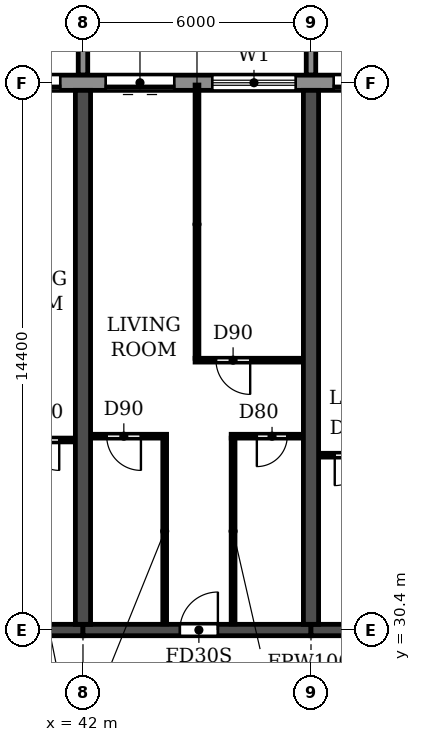
"""IFC4 building model, lengths in metres.
Left out: names, types, materials, properties, quantities, classifications, styles, units other than length and angle.
Written with IfcOpenShell. Run it as: python <this file> out.ifc"""

import sys

from ifc_helpers import new_model, si_unit, direction, frame, frame_2d, origin, place, context, subcontext, project, spatial, polyline, rectangle, outline, extrude, source, transform, mapped, element, fill, save


model = new_model("IFC4")
c1 = context("Model", 3, precision=1e-05, world=origin(), true_north=direction((0.0, 1.0)))
c2 = subcontext(c1, "Body", "Model", "MODEL_VIEW")
j1 = project(units=[si_unit("LENGTHUNIT", "METRE"), si_unit("PLANEANGLEUNIT", "RADIAN")], contexts=[c1])
p1 = place(None, origin())
s1 = spatial("IfcSite", under=j1, at=p1, CompositionType="ELEMENT")
p2 = place(p1, origin())
s2 = spatial("IfcBuilding", under=s1, at=p2, CompositionType="ELEMENT")
p3 = place(p2, frame((0.0, 0.0, 26.7)))
s3 = spatial("IfcBuildingStorey", under=s2, at=p3, CompositionType="ELEMENT", Elevation=26.7)
for number, where, z_axis, x_axis in (
    (1, (42.0, 30.55, 0.0), (0.0, 0.0, 1.0), (0.0, 1.0, 0.0)),
    (2, (48.0, 30.55, 0.0), (0.0, 0.0, 1.0), (0.0, 1.0, 0.0)),
):
    element("IfcWall", number, at=place(p3, frame(where, z_axis=z_axis, x_axis=x_axis)), inside=s3, PredefinedType="SHEAR", context=c2, shape_type="SweptSolid", body=[
        extrude(rectangle(XDim=14.05, YDim=0.4, at=frame_2d((7.025, 0.0))), origin(), (0.0, 0.0, 1.0), 3.05),
    ])
p4 = place(p3, frame((36.0, 30.4, 0.0), z_axis=(0.0, 0.0, 1.0), x_axis=(1.0, 0.0, 0.0)))
e3 = element("IfcWall", 3, at=p4, inside=s3, PredefinedType="SHEAR", context=c2, shape_type="SweptSolid", body=[
    extrude(rectangle(XDim=6.0, YDim=0.3, at=frame_2d((3.0, 0.0))), origin(), (0.0, 0.0, 1.0), 2.45),
])
p5 = place(p4, frame((2.55, 0.0, 0.0)))
e4 = element("IfcOpeningElement", 4, at=p5, cuts=e3, PredefinedType="OPENING", context=c2, shape_type="SweptSolid", body=[
    extrude(rectangle(XDim=1.0, YDim=2.1, at=frame_2d((0.5, 1.05))), frame((0.0, 0.16, 0.0), z_axis=(0.0, -1.0, 0.0), x_axis=(1.0, 0.0, 0.0)), (0.0, 0.0, 1.0), 0.32),
])
p6 = place(p3, frame((42.0, 30.4, 0.0), z_axis=(0.0, 0.0, 1.0), x_axis=(1.0, 0.0, 0.0)))
e5 = element("IfcWall", 5, at=p6, inside=s3, PredefinedType="SHEAR", context=c2, shape_type="SweptSolid", body=[
    extrude(rectangle(XDim=6.0, YDim=0.3, at=frame_2d((3.0, 0.0))), origin(), (0.0, 0.0, 1.0), 2.45),
])
p7 = place(p6, frame((2.55, 0.0, 0.0)))
e6 = element("IfcOpeningElement", 6, at=p7, cuts=e5, PredefinedType="OPENING", context=c2, shape_type="SweptSolid", body=[
    extrude(rectangle(XDim=1.0, YDim=2.1, at=frame_2d((0.5, 1.05))), frame((0.0, 0.16, 0.0), z_axis=(0.0, -1.0, 0.0), x_axis=(1.0, 0.0, 0.0)), (0.0, 0.0, 1.0), 0.32),
])
p8 = place(p3, frame((48.0, 30.4, 0.0), z_axis=(0.0, 0.0, 1.0), x_axis=(1.0, 0.0, 0.0)))
e7 = element("IfcWall", 7, at=p8, inside=s3, PredefinedType="SHEAR", context=c2, shape_type="SweptSolid", body=[
    extrude(rectangle(XDim=6.0, YDim=0.3, at=frame_2d((3.0, 0.0))), origin(), (0.0, 0.0, 1.0), 2.45),
])
p9 = place(p8, frame((2.45, 0.0, 0.0)))
e8 = element("IfcOpeningElement", 8, at=p9, cuts=e7, PredefinedType="OPENING", context=c2, shape_type="SweptSolid", body=[
    extrude(rectangle(XDim=1.0, YDim=2.1, at=frame_2d((0.5, 1.05))), frame((0.0, 0.16, 0.0), z_axis=(0.0, -1.0, 0.0), x_axis=(1.0, 0.0, 0.0)), (0.0, 0.0, 1.0), 0.32),
])
p10 = place(p3, frame((97.317, 44.8, 0.0), z_axis=(0.0, 0.0, 1.0), x_axis=(-1.0, 0.0, 0.0)))
e9 = element("IfcWall", 9, at=p10, inside=s3, PredefinedType="STANDARD", context=c2, shape_type="SweptSolid", body=[
    extrude(rectangle(XDim=92.634, YDim=0.4, at=frame_2d((46.317, 0.0))), origin(), (0.0, 0.0, 1.0), 3.05),
])
p11 = place(p10, frame((88.717, 0.0, 0.9)))
e10 = element("IfcOpeningElement", 10, at=p11, cuts=e9, PredefinedType="OPENING", context=c2, shape_type="SweptSolid", body=[
    extrude(rectangle(XDim=2.2, YDim=1.5, at=frame_2d((1.1, 0.75))), frame((0.0, 0.21, 0.0), z_axis=(0.0, -1.0, 0.0), x_axis=(1.0, 0.0, 0.0)), (0.0, 0.0, 1.0), 0.42),
])
p12 = place(p10, frame((85.917, 0.0, 0.0)))
e11 = element("IfcOpeningElement", 11, at=p12, cuts=e9, PredefinedType="OPENING", context=c2, shape_type="SweptSolid", body=[
    extrude(rectangle(XDim=1.8, YDim=2.4, at=frame_2d((0.9, 1.2))), frame((0.0, 0.21, 0.0), z_axis=(0.0, -1.0, 0.0), x_axis=(1.0, 0.0, 0.0)), (0.0, 0.0, 1.0), 0.42),
])
p13 = place(p10, frame((82.717, 0.0, 0.9)))
e12 = element("IfcOpeningElement", 12, at=p13, cuts=e9, PredefinedType="OPENING", context=c2, shape_type="SweptSolid", body=[
    extrude(rectangle(XDim=2.2, YDim=1.5, at=frame_2d((1.1, 0.75))), frame((0.0, 0.21, 0.0), z_axis=(0.0, -1.0, 0.0), x_axis=(1.0, 0.0, 0.0)), (0.0, 0.0, 1.0), 0.42),
])
p14 = place(p10, frame((79.717, 0.0, 0.9)))
e13 = element("IfcOpeningElement", 13, at=p14, cuts=e9, PredefinedType="OPENING", context=c2, shape_type="SweptSolid", body=[
    extrude(rectangle(XDim=2.2, YDim=1.5, at=frame_2d((1.1, 0.75))), frame((0.0, 0.21, 0.0), z_axis=(0.0, -1.0, 0.0), x_axis=(1.0, 0.0, 0.0)), (0.0, 0.0, 1.0), 0.42),
])
p15 = place(p10, frame((76.917, 0.0, 0.0)))
e14 = element("IfcOpeningElement", 14, at=p15, cuts=e9, PredefinedType="OPENING", context=c2, shape_type="SweptSolid", body=[
    extrude(rectangle(XDim=1.8, YDim=2.4, at=frame_2d((0.9, 1.2))), frame((0.0, 0.21, 0.0), z_axis=(0.0, -1.0, 0.0), x_axis=(1.0, 0.0, 0.0)), (0.0, 0.0, 1.0), 0.42),
])
p16 = place(p10, frame((73.717, 0.0, 0.9)))
e15 = element("IfcOpeningElement", 15, at=p16, cuts=e9, PredefinedType="OPENING", context=c2, shape_type="SweptSolid", body=[
    extrude(rectangle(XDim=2.2, YDim=1.5, at=frame_2d((1.1, 0.75))), frame((0.0, 0.21, 0.0), z_axis=(0.0, -1.0, 0.0), x_axis=(1.0, 0.0, 0.0)), (0.0, 0.0, 1.0), 0.42),
])
p17 = place(p10, frame((70.717, 0.0, 0.9)))
e16 = element("IfcOpeningElement", 16, at=p17, cuts=e9, PredefinedType="OPENING", context=c2, shape_type="SweptSolid", body=[
    extrude(rectangle(XDim=2.2, YDim=1.5, at=frame_2d((1.1, 0.75))), frame((0.0, 0.21, 0.0), z_axis=(0.0, -1.0, 0.0), x_axis=(1.0, 0.0, 0.0)), (0.0, 0.0, 1.0), 0.42),
])
p18 = place(p10, frame((67.717, 0.0, 0.9)))
e17 = element("IfcOpeningElement", 17, at=p18, cuts=e9, PredefinedType="OPENING", context=c2, shape_type="SweptSolid", body=[
    extrude(rectangle(XDim=2.2, YDim=1.5, at=frame_2d((1.1, 0.75))), frame((0.0, 0.21, 0.0), z_axis=(0.0, -1.0, 0.0), x_axis=(1.0, 0.0, 0.0)), (0.0, 0.0, 1.0), 0.42),
])
p19 = place(p10, frame((64.917, 0.0, 0.0)))
e18 = element("IfcOpeningElement", 18, at=p19, cuts=e9, PredefinedType="OPENING", context=c2, shape_type="SweptSolid", body=[
    extrude(rectangle(XDim=1.8, YDim=2.4, at=frame_2d((0.9, 1.2))), frame((0.0, 0.21, 0.0), z_axis=(0.0, -1.0, 0.0), x_axis=(1.0, 0.0, 0.0)), (0.0, 0.0, 1.0), 0.42),
])
p20 = place(p10, frame((61.717, 0.0, 0.9)))
e19 = element("IfcOpeningElement", 19, at=p20, cuts=e9, PredefinedType="OPENING", context=c2, shape_type="SweptSolid", body=[
    extrude(rectangle(XDim=2.2, YDim=1.5, at=frame_2d((1.1, 0.75))), frame((0.0, 0.21, 0.0), z_axis=(0.0, -1.0, 0.0), x_axis=(1.0, 0.0, 0.0)), (0.0, 0.0, 1.0), 0.42),
])
p21 = place(p10, frame((58.717, 0.0, 0.9)))
e20 = element("IfcOpeningElement", 20, at=p21, cuts=e9, PredefinedType="OPENING", context=c2, shape_type="SweptSolid", body=[
    extrude(rectangle(XDim=2.2, YDim=1.5, at=frame_2d((1.1, 0.75))), frame((0.0, 0.21, 0.0), z_axis=(0.0, -1.0, 0.0), x_axis=(1.0, 0.0, 0.0)), (0.0, 0.0, 1.0), 0.42),
])
p22 = place(p10, frame((55.917, 0.0, 0.0)))
e21 = element("IfcOpeningElement", 21, at=p22, cuts=e9, PredefinedType="OPENING", context=c2, shape_type="SweptSolid", body=[
    extrude(rectangle(XDim=1.8, YDim=2.4, at=frame_2d((0.9, 1.2))), frame((0.0, 0.21, 0.0), z_axis=(0.0, -1.0, 0.0), x_axis=(1.0, 0.0, 0.0)), (0.0, 0.0, 1.0), 0.42),
])
p23 = place(p10, frame((52.917, 0.0, 0.0)))
e22 = element("IfcOpeningElement", 22, at=p23, cuts=e9, PredefinedType="OPENING", context=c2, shape_type="SweptSolid", body=[
    extrude(rectangle(XDim=1.8, YDim=2.4, at=frame_2d((0.9, 1.2))), frame((0.0, 0.21, 0.0), z_axis=(0.0, -1.0, 0.0), x_axis=(1.0, 0.0, 0.0)), (0.0, 0.0, 1.0), 0.42),
])
p24 = place(p10, frame((49.717, 0.0, 0.9)))
e23 = element("IfcOpeningElement", 23, at=p24, cuts=e9, PredefinedType="OPENING", context=c2, shape_type="SweptSolid", body=[
    extrude(rectangle(XDim=2.2, YDim=1.5, at=frame_2d((1.1, 0.75))), frame((0.0, 0.21, 0.0), z_axis=(0.0, -1.0, 0.0), x_axis=(1.0, 0.0, 0.0)), (0.0, 0.0, 1.0), 0.42),
])
p25 = place(p10, frame((46.917, 0.0, 0.0)))
e24 = element("IfcOpeningElement", 24, at=p25, cuts=e9, PredefinedType="OPENING", context=c2, shape_type="SweptSolid", body=[
    extrude(rectangle(XDim=1.8, YDim=2.4, at=frame_2d((0.9, 1.2))), frame((0.0, 0.21, 0.0), z_axis=(0.0, -1.0, 0.0), x_axis=(1.0, 0.0, 0.0)), (0.0, 0.0, 1.0), 0.42),
])
p26 = place(p10, frame((43.717, 0.0, 0.9)))
e25 = element("IfcOpeningElement", 25, at=p26, cuts=e9, PredefinedType="OPENING", context=c2, shape_type="SweptSolid", body=[
    extrude(rectangle(XDim=2.2, YDim=1.5, at=frame_2d((1.1, 0.75))), frame((0.0, 0.21, 0.0), z_axis=(0.0, -1.0, 0.0), x_axis=(1.0, 0.0, 0.0)), (0.0, 0.0, 1.0), 0.42),
])
p27 = place(p10, frame((40.717, 0.0, 0.9)))
e26 = element("IfcOpeningElement", 26, at=p27, cuts=e9, PredefinedType="OPENING", context=c2, shape_type="SweptSolid", body=[
    extrude(rectangle(XDim=2.2, YDim=1.5, at=frame_2d((1.1, 0.75))), frame((0.0, 0.21, 0.0), z_axis=(0.0, -1.0, 0.0), x_axis=(1.0, 0.0, 0.0)), (0.0, 0.0, 1.0), 0.42),
])
p28 = place(p10, frame((37.917, 0.0, 0.0)))
e27 = element("IfcOpeningElement", 27, at=p28, cuts=e9, PredefinedType="OPENING", context=c2, shape_type="SweptSolid", body=[
    extrude(rectangle(XDim=1.8, YDim=2.4, at=frame_2d((0.9, 1.2))), frame((0.0, 0.21, 0.0), z_axis=(0.0, -1.0, 0.0), x_axis=(1.0, 0.0, 0.0)), (0.0, 0.0, 1.0), 0.42),
])
p29 = place(p10, frame((34.917, 0.0, 0.0)))
e28 = element("IfcOpeningElement", 28, at=p29, cuts=e9, PredefinedType="OPENING", context=c2, shape_type="SweptSolid", body=[
    extrude(rectangle(XDim=1.8, YDim=2.4, at=frame_2d((0.9, 1.2))), frame((0.0, 0.21, 0.0), z_axis=(0.0, -1.0, 0.0), x_axis=(1.0, 0.0, 0.0)), (0.0, 0.0, 1.0), 0.42),
])
p30 = place(p10, frame((31.717, 0.0, 0.9)))
e29 = element("IfcOpeningElement", 29, at=p30, cuts=e9, PredefinedType="OPENING", context=c2, shape_type="SweptSolid", body=[
    extrude(rectangle(XDim=2.2, YDim=1.5, at=frame_2d((1.1, 0.75))), frame((0.0, 0.21, 0.0), z_axis=(0.0, -1.0, 0.0), x_axis=(1.0, 0.0, 0.0)), (0.0, 0.0, 1.0), 0.42),
])
p31 = place(p10, frame((28.717, 0.0, 0.9)))
e30 = element("IfcOpeningElement", 30, at=p31, cuts=e9, PredefinedType="OPENING", context=c2, shape_type="SweptSolid", body=[
    extrude(rectangle(XDim=2.2, YDim=1.5, at=frame_2d((1.1, 0.75))), frame((0.0, 0.21, 0.0), z_axis=(0.0, -1.0, 0.0), x_axis=(1.0, 0.0, 0.0)), (0.0, 0.0, 1.0), 0.42),
])
p32 = place(p10, frame((25.717, 0.0, 0.9)))
e31 = element("IfcOpeningElement", 31, at=p32, cuts=e9, PredefinedType="OPENING", context=c2, shape_type="SweptSolid", body=[
    extrude(rectangle(XDim=2.2, YDim=1.5, at=frame_2d((1.1, 0.75))), frame((0.0, 0.21, 0.0), z_axis=(0.0, -1.0, 0.0), x_axis=(1.0, 0.0, 0.0)), (0.0, 0.0, 1.0), 0.42),
])
p33 = place(p10, frame((22.717, 0.0, 0.9)))
e32 = element("IfcOpeningElement", 32, at=p33, cuts=e9, PredefinedType="OPENING", context=c2, shape_type="SweptSolid", body=[
    extrude(rectangle(XDim=2.2, YDim=1.5, at=frame_2d((1.1, 0.75))), frame((0.0, 0.21, 0.0), z_axis=(0.0, -1.0, 0.0), x_axis=(1.0, 0.0, 0.0)), (0.0, 0.0, 1.0), 0.42),
])
p34 = place(p10, frame((19.917, 0.0, 0.0)))
e33 = element("IfcOpeningElement", 33, at=p34, cuts=e9, PredefinedType="OPENING", context=c2, shape_type="SweptSolid", body=[
    extrude(rectangle(XDim=1.8, YDim=2.4, at=frame_2d((0.9, 1.2))), frame((0.0, 0.21, 0.0), z_axis=(0.0, -1.0, 0.0), x_axis=(1.0, 0.0, 0.0)), (0.0, 0.0, 1.0), 0.42),
])
p35 = place(p10, frame((16.717, 0.0, 0.9)))
e34 = element("IfcOpeningElement", 34, at=p35, cuts=e9, PredefinedType="OPENING", context=c2, shape_type="SweptSolid", body=[
    extrude(rectangle(XDim=2.2, YDim=1.5, at=frame_2d((1.1, 0.75))), frame((0.0, 0.21, 0.0), z_axis=(0.0, -1.0, 0.0), x_axis=(1.0, 0.0, 0.0)), (0.0, 0.0, 1.0), 0.42),
])
p36 = place(p10, frame((13.717, 0.0, 0.9)))
e35 = element("IfcOpeningElement", 35, at=p36, cuts=e9, PredefinedType="OPENING", context=c2, shape_type="SweptSolid", body=[
    extrude(rectangle(XDim=2.2, YDim=1.5, at=frame_2d((1.1, 0.75))), frame((0.0, 0.21, 0.0), z_axis=(0.0, -1.0, 0.0), x_axis=(1.0, 0.0, 0.0)), (0.0, 0.0, 1.0), 0.42),
])
p37 = place(p10, frame((10.717, 0.0, 0.9)))
e36 = element("IfcOpeningElement", 36, at=p37, cuts=e9, PredefinedType="OPENING", context=c2, shape_type="SweptSolid", body=[
    extrude(rectangle(XDim=2.2, YDim=1.5, at=frame_2d((1.1, 0.75))), frame((0.0, 0.21, 0.0), z_axis=(0.0, -1.0, 0.0), x_axis=(1.0, 0.0, 0.0)), (0.0, 0.0, 1.0), 0.42),
])
p38 = place(p10, frame((7.917, 0.0, 0.0)))
e37 = element("IfcOpeningElement", 37, at=p38, cuts=e9, PredefinedType="OPENING", context=c2, shape_type="SweptSolid", body=[
    extrude(rectangle(XDim=1.8, YDim=2.4, at=frame_2d((0.9, 1.2))), frame((0.0, 0.21, 0.0), z_axis=(0.0, -1.0, 0.0), x_axis=(1.0, 0.0, 0.0)), (0.0, 0.0, 1.0), 0.42),
])
p39 = place(p10, frame((4.917, 0.0, 0.0)))
e38 = element("IfcOpeningElement", 38, at=p39, cuts=e9, PredefinedType="OPENING", context=c2, shape_type="SweptSolid", body=[
    extrude(rectangle(XDim=1.8, YDim=2.4, at=frame_2d((0.9, 1.2))), frame((0.0, 0.21, 0.0), z_axis=(0.0, -1.0, 0.0), x_axis=(1.0, 0.0, 0.0)), (0.0, 0.0, 1.0), 0.42),
])
p40 = place(p10, frame((1.717, 0.0, 0.9)))
e39 = element("IfcOpeningElement", 39, at=p40, cuts=e9, PredefinedType="OPENING", context=c2, shape_type="SweptSolid", body=[
    extrude(rectangle(XDim=2.2, YDim=1.5, at=frame_2d((1.1, 0.75))), frame((0.0, 0.21, 0.0), z_axis=(0.0, -1.0, 0.0), x_axis=(1.0, 0.0, 0.0)), (0.0, 0.0, 1.0), 0.42),
])
m1 = source(origin(), c2, "Body", "SweptSolid", [
    extrude(outline(polyline([(0.0, 0.0), (0.25, 0.0), (0.25, 3.1), (0.0, 3.1), (0.0, 0.0)])), origin(), (0.0, 0.0, 1.0), 3.1),
])
for number, where in (
    (40, (41.875, 45.0, 0.0)),
    (41, (47.875, 45.0, 0.0)),
):
    element("IfcWall", number, at=place(p3, frame(where)), inside=s3, PredefinedType="STANDARD", context=c2, shape_type="MappedRepresentation", body=[
        mapped(m1, transform((0.0, 0.0, 0.0))),
    ])
p41 = place(p3, frame((48.21, 35.0, 0.0), z_axis=(0.0, 0.0, 1.0), x_axis=(1.0, 0.0, 0.0)))
e42 = element("IfcWall", 42, at=p41, inside=s3, PredefinedType="PARTITIONING", context=c2, shape_type="SweptSolid", body=[
    extrude(rectangle(XDim=1.89, YDim=0.1, at=frame_2d((0.945, 0.0))), origin(), (0.0, 0.0, 1.0), 3.05),
])
p42 = place(p41, frame((0.415, 0.0, 0.0)))
e43 = element("IfcOpeningElement", 43, at=p42, cuts=e42, PredefinedType="OPENING", context=c2, shape_type="SweptSolid", body=[
    extrude(rectangle(XDim=0.8, YDim=2.1, at=frame_2d((0.4, 1.05))), frame((0.0, 0.06, 0.0), z_axis=(0.0, -1.0, 0.0), x_axis=(1.0, 0.0, 0.0)), (0.0, 0.0, 1.0), 0.12),
])
p43 = place(p3, frame((39.9, 35.4, 0.0), z_axis=(0.0, 0.0, 1.0), x_axis=(1.0, 0.0, 0.0)))
e44 = element("IfcWall", 44, at=p43, inside=s3, PredefinedType="PARTITIONING", context=c2, shape_type="SweptSolid", body=[
    extrude(rectangle(XDim=1.89, YDim=0.1, at=frame_2d((0.945, 0.0))), origin(), (0.0, 0.0, 1.0), 3.05),
])
p44 = place(p43, frame((0.675, 0.0, 0.0)))
e45 = element("IfcOpeningElement", 45, at=p44, cuts=e44, PredefinedType="OPENING", context=c2, shape_type="SweptSolid", body=[
    extrude(rectangle(XDim=0.8, YDim=2.1, at=frame_2d((0.4, 1.05))), frame((0.0, 0.06, 0.0), z_axis=(0.0, -1.0, 0.0), x_axis=(1.0, 0.0, 0.0)), (0.0, 0.0, 1.0), 0.12),
])
p45 = place(p3, frame((42.21, 35.5, 0.0), z_axis=(0.0, 0.0, 1.0), x_axis=(1.0, 0.0, 0.0)))
e46 = element("IfcWall", 46, at=p45, inside=s3, PredefinedType="PARTITIONING", context=c2, shape_type="SweptSolid", body=[
    extrude(rectangle(XDim=1.99, YDim=0.1, at=frame_2d((0.995, 0.0))), origin(), (0.0, 0.0, 1.0), 3.05),
])
p46 = place(p45, frame((0.415, 0.0, 0.0)))
e47 = element("IfcOpeningElement", 47, at=p46, cuts=e46, PredefinedType="OPENING", context=c2, shape_type="SweptSolid", body=[
    extrude(rectangle(XDim=0.9, YDim=2.1, at=frame_2d((0.45, 1.05))), frame((0.0, 0.06, 0.0), z_axis=(0.0, -1.0, 0.0), x_axis=(1.0, 0.0, 0.0)), (0.0, 0.0, 1.0), 0.12),
])
p47 = place(p3, frame((45.9, 35.5, 0.0), z_axis=(0.0, 0.0, 1.0), x_axis=(1.0, 0.0, 0.0)))
e48 = element("IfcWall", 48, at=p47, inside=s3, PredefinedType="PARTITIONING", context=c2, shape_type="SweptSolid", body=[
    extrude(rectangle(XDim=1.89, YDim=0.1, at=frame_2d((0.945, 0.0))), origin(), (0.0, 0.0, 1.0), 3.05),
])
p48 = place(p47, frame((0.675, 0.0, 0.0)))
e49 = element("IfcOpeningElement", 49, at=p48, cuts=e48, PredefinedType="OPENING", context=c2, shape_type="SweptSolid", body=[
    extrude(rectangle(XDim=0.8, YDim=2.1, at=frame_2d((0.4, 1.05))), frame((0.0, 0.06, 0.0), z_axis=(0.0, -1.0, 0.0), x_axis=(1.0, 0.0, 0.0)), (0.0, 0.0, 1.0), 0.12),
])
p49 = place(p3, frame((44.95, 37.5, 0.0), z_axis=(0.0, 0.0, 1.0), x_axis=(1.0, 0.0, 0.0)))
e50 = element("IfcWall", 50, at=p49, inside=s3, PredefinedType="PARTITIONING", context=c2, shape_type="SweptSolid", body=[
    extrude(rectangle(XDim=2.84, YDim=0.1, at=frame_2d((1.42, 0.0))), origin(), (0.0, 0.0, 1.0), 3.05),
])
p50 = place(p49, frame((0.55, 0.0, 0.0)))
e51 = element("IfcOpeningElement", 51, at=p50, cuts=e50, PredefinedType="OPENING", context=c2, shape_type="SweptSolid", body=[
    extrude(rectangle(XDim=0.9, YDim=2.1, at=frame_2d((0.45, 1.05))), frame((0.0, 0.06, 0.0), z_axis=(0.0, -1.0, 0.0), x_axis=(1.0, 0.0, 0.0)), (0.0, 0.0, 1.0), 0.12),
])
p51 = place(p3, frame((44.15, 30.56, 0.0), z_axis=(0.0, 0.0, 1.0), x_axis=(0.0, 1.0, 0.0)))
e52 = element("IfcWall", 52, at=p51, inside=s3, PredefinedType="PARTITIONING", context=c2, shape_type="SweptSolid", body=[
    extrude(rectangle(XDim=4.89, YDim=0.1, at=frame_2d((2.445, 0.0))), origin(), (0.0, 0.0, 1.0), 3.05),
])
p52 = place(p3, frame((45.0, 37.55, 0.0), z_axis=(0.0, 0.0, 1.0), x_axis=(0.0, 1.0, 0.0)))
e53 = element("IfcWall", 53, at=p52, inside=s3, PredefinedType="PARTITIONING", context=c2, shape_type="SweptSolid", body=[
    extrude(rectangle(XDim=7.19, YDim=0.1, at=frame_2d((3.595, 0.0))), origin(), (0.0, 0.0, 1.0), 3.05),
])
p53 = place(p3, frame((45.95, 30.56, 0.0), z_axis=(0.0, 0.0, 1.0), x_axis=(0.0, 1.0, 0.0)))
e54 = element("IfcWall", 54, at=p53, inside=s3, PredefinedType="PARTITIONING", context=c2, shape_type="SweptSolid", body=[
    extrude(rectangle(XDim=4.89, YDim=0.1, at=frame_2d((2.445, 0.0))), origin(), (0.0, 0.0, 1.0), 3.05),
])
p54 = place(p22, origin())
e55 = element("IfcDoor", 55, at=p54, inside=s3, OperationType="DOUBLE_DOOR_SLIDING", PredefinedType="DOOR", context=c2, shape_type="SweptSolid", body=[
    extrude(rectangle(XDim=1.8, YDim=2.4, at=frame_2d((0.9, 1.2))), frame((0.0, 0.025, 0.0), z_axis=(0.0, -1.0, 0.0), x_axis=(1.0, 0.0, 0.0)), (0.0, 0.0, 1.0), 0.05),
])
fill(e21, e55)
p55 = place(p23, origin())
e56 = element("IfcDoor", 56, at=p55, inside=s3, OperationType="DOUBLE_DOOR_SLIDING", PredefinedType="DOOR", context=c2, shape_type="SweptSolid", body=[
    extrude(rectangle(XDim=1.8, YDim=2.4, at=frame_2d((0.9, 1.2))), frame((0.0, 0.025, 0.0), z_axis=(0.0, -1.0, 0.0), x_axis=(1.0, 0.0, 0.0)), (0.0, 0.0, 1.0), 0.05),
])
fill(e22, e56)
p56 = place(p24, origin())
e57 = element("IfcWindow", 57, at=p56, inside=s3, PartitioningType="DOUBLE_PANEL_HORIZONTAL", PredefinedType="WINDOW", context=c2, shape_type="SweptSolid", body=[
    extrude(rectangle(XDim=2.2, YDim=1.5, at=frame_2d((1.1, 0.75))), frame((0.0, 0.03, 0.0), z_axis=(0.0, -1.0, 0.0), x_axis=(1.0, 0.0, 0.0)), (0.0, 0.0, 1.0), 0.06),
])
fill(e23, e57)
p57 = place(p25, origin())
e58 = element("IfcDoor", 58, at=p57, inside=s3, OperationType="DOUBLE_DOOR_SLIDING", PredefinedType="DOOR", context=c2, shape_type="SweptSolid", body=[
    extrude(rectangle(XDim=1.8, YDim=2.4, at=frame_2d((0.9, 1.2))), frame((0.0, 0.025, 0.0), z_axis=(0.0, -1.0, 0.0), x_axis=(1.0, 0.0, 0.0)), (0.0, 0.0, 1.0), 0.05),
])
fill(e24, e58)
p58 = place(p44, frame((0.8, 0.0, 0.0), z_axis=(0.0, 0.0, 1.0), x_axis=(-1.0, 0.0, 0.0)))
e59 = element("IfcDoor", 59, at=p58, inside=s3, OperationType="SINGLE_SWING_LEFT", PredefinedType="DOOR", context=c2, shape_type="SweptSolid", body=[
    extrude(rectangle(XDim=0.8, YDim=2.1, at=frame_2d((0.4, 1.05))), frame((0.0, 0.025, 0.0), z_axis=(0.0, -1.0, 0.0), x_axis=(1.0, 0.0, 0.0)), (0.0, 0.0, 1.0), 0.05),
])
fill(e45, e59)
p59 = place(p46, frame((0.9, 0.0, 0.0), z_axis=(0.0, 0.0, 1.0), x_axis=(-1.0, 0.0, 0.0)))
e60 = element("IfcDoor", 60, at=p59, inside=s3, OperationType="SINGLE_SWING_LEFT", PredefinedType="DOOR", context=c2, shape_type="SweptSolid", body=[
    extrude(rectangle(XDim=0.9, YDim=2.1, at=frame_2d((0.45, 1.05))), frame((0.0, 0.025, 0.0), z_axis=(0.0, -1.0, 0.0), x_axis=(1.0, 0.0, 0.0)), (0.0, 0.0, 1.0), 0.05),
])
fill(e47, e60)
p60 = place(p7, origin())
e61 = element("IfcDoor", 61, at=p60, inside=s3, OperationType="SINGLE_SWING_RIGHT", PredefinedType="DOOR", context=c2, shape_type="SweptSolid", body=[
    extrude(rectangle(XDim=1.0, YDim=2.1, at=frame_2d((0.5, 1.05))), frame((0.0, 0.025, 0.0), z_axis=(0.0, -1.0, 0.0), x_axis=(1.0, 0.0, 0.0)), (0.0, 0.0, 1.0), 0.05),
])
fill(e6, e61)
p61 = place(p50, frame((0.9, 0.0, 0.0), z_axis=(0.0, 0.0, 1.0), x_axis=(-1.0, 0.0, 0.0)))
e62 = element("IfcDoor", 62, at=p61, inside=s3, OperationType="SINGLE_SWING_LEFT", PredefinedType="DOOR", context=c2, shape_type="SweptSolid", body=[
    extrude(rectangle(XDim=0.9, YDim=2.1, at=frame_2d((0.45, 1.05))), frame((0.0, 0.025, 0.0), z_axis=(0.0, -1.0, 0.0), x_axis=(1.0, 0.0, 0.0)), (0.0, 0.0, 1.0), 0.05),
])
fill(e51, e62)
p62 = place(p48, frame((0.8, 0.0, 0.0), z_axis=(0.0, 0.0, 1.0), x_axis=(-1.0, 0.0, 0.0)))
e63 = element("IfcDoor", 63, at=p62, inside=s3, OperationType="SINGLE_SWING_RIGHT", PredefinedType="DOOR", context=c2, shape_type="SweptSolid", body=[
    extrude(rectangle(XDim=0.8, YDim=2.1, at=frame_2d((0.4, 1.05))), frame((0.0, 0.025, 0.0), z_axis=(0.0, -1.0, 0.0), x_axis=(1.0, 0.0, 0.0)), (0.0, 0.0, 1.0), 0.05),
])
fill(e49, e63)
p63 = place(p42, frame((0.8, 0.0, 0.0), z_axis=(0.0, 0.0, 1.0), x_axis=(-1.0, 0.0, 0.0)))
e64 = element("IfcDoor", 64, at=p63, inside=s3, OperationType="SINGLE_SWING_RIGHT", PredefinedType="DOOR", context=c2, shape_type="SweptSolid", body=[
    extrude(rectangle(XDim=0.8, YDim=2.1, at=frame_2d((0.4, 1.05))), frame((0.0, 0.025, 0.0), z_axis=(0.0, -1.0, 0.0), x_axis=(1.0, 0.0, 0.0)), (0.0, 0.0, 1.0), 0.05),
])
fill(e43, e64)
save(model, sys.argv[1])
